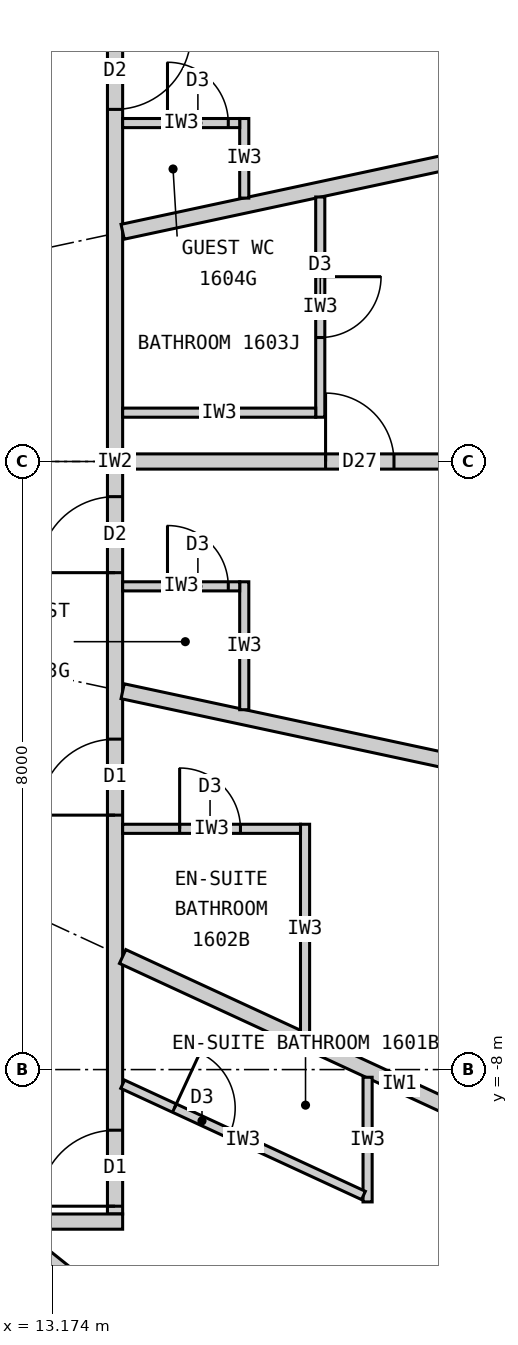
"""IFC4 building model, lengths in metres.
Left out: names, types, materials, properties, quantities, classifications, styles, units other than length and angle.
Written with IfcOpenShell. Run it as: python <this file> out.ifc"""

import sys

from ifc_helpers import new_model, si_unit, direction, frame, frame_2d, origin, place, context, subcontext, project, spatial, rectangle, extrude, element, fill, save


model = new_model("IFC4")
c1 = context("Model", 3, precision=1e-05, world=origin(), true_north=direction((0.0, 1.0)))
c2 = subcontext(c1, "Body", "Model", "MODEL_VIEW")
j1 = project(units=[si_unit("LENGTHUNIT", "METRE"), si_unit("PLANEANGLEUNIT", "RADIAN")], contexts=[c1])
p1 = place(None, origin())
s1 = spatial("IfcSite", under=j1, at=p1, CompositionType="ELEMENT")
p2 = place(p1, origin())
s2 = spatial("IfcBuilding", under=s1, at=p2, CompositionType="ELEMENT")
p3 = place(p2, frame((0.0, 0.0, 67.2)))
s3 = spatial("IfcBuildingStorey", under=s2, at=p3, CompositionType="ELEMENT", Elevation=67.2)
p4 = place(p3, frame((14.0, -9.9, 0.0), z_axis=(0.0, 0.0, 1.0), x_axis=(0.0, 1.0, 0.0)))
e1 = element("IfcWall", 1, at=p4, inside=s3, PredefinedType="PARTITIONING", context=c2, shape_type="SweptSolid", body=[
    extrude(rectangle(XDim=19.8, YDim=0.2, at=frame_2d((9.9, 0.0))), origin(), (0.0, 0.0, 1.0), 3.12),
])
p5 = place(p4, frame((0.103, 0.0, 0.0)))
e2 = element("IfcOpeningElement", 2, at=p5, cuts=e1, PredefinedType="OPENING", context=c2, shape_type="SweptSolid", body=[
    extrude(rectangle(XDim=1.0, YDim=2.2, at=frame_2d((0.5, 1.1))), frame((0.0, 0.11, 0.0), z_axis=(0.0, -1.0, 0.0), x_axis=(1.0, 0.0, 0.0)), (0.0, 0.0, 1.0), 0.22),
])
p6 = place(p4, frame((5.248, 0.0, 0.0)))
e3 = element("IfcOpeningElement", 3, at=p6, cuts=e1, PredefinedType="OPENING", context=c2, shape_type="SweptSolid", body=[
    extrude(rectangle(XDim=1.0, YDim=2.2, at=frame_2d((0.5, 1.1))), frame((0.0, 0.11, 0.0), z_axis=(0.0, -1.0, 0.0), x_axis=(1.0, 0.0, 0.0)), (0.0, 0.0, 1.0), 0.22),
])
p7 = place(p4, frame((8.438, 0.0, 0.0)))
e4 = element("IfcOpeningElement", 4, at=p7, cuts=e1, PredefinedType="OPENING", context=c2, shape_type="SweptSolid", body=[
    extrude(rectangle(XDim=1.0, YDim=2.2, at=frame_2d((0.5, 1.1))), frame((0.0, 0.11, 0.0), z_axis=(0.0, -1.0, 0.0), x_axis=(1.0, 0.0, 0.0)), (0.0, 0.0, 1.0), 0.22),
])
p8 = place(p4, frame((14.532, 0.0, 0.0)))
e5 = element("IfcOpeningElement", 5, at=p8, cuts=e1, PredefinedType="OPENING", context=c2, shape_type="SweptSolid", body=[
    extrude(rectangle(XDim=1.0, YDim=2.2, at=frame_2d((0.5, 1.1))), frame((0.0, 0.11, 0.0), z_axis=(0.0, -1.0, 0.0), x_axis=(1.0, 0.0, 0.0)), (0.0, 0.0, 1.0), 0.22),
])
p9 = place(p3, frame((14.1, -10.0, 0.0), z_axis=(0.0, 0.0, 1.0), x_axis=(-1.0, 0.0, 0.0)))
e6 = element("IfcWall", 6, at=p9, inside=s3, PredefinedType="PARTITIONING", context=c2, shape_type="SweptSolid", body=[
    extrude(rectangle(XDim=28.2, YDim=0.2, at=frame_2d((14.1, 0.0))), origin(), (0.0, 0.0, 1.0), 3.12),
])
p10 = place(p9, frame((23.865, 0.0, 0.0)))
e7 = element("IfcOpeningElement", 7, at=p10, cuts=e6, PredefinedType="OPENING", context=c2, shape_type="SweptSolid", body=[
    extrude(rectangle(XDim=1.0, YDim=2.2, at=frame_2d((0.5, 1.1))), frame((0.0, 0.11, 0.0), z_axis=(0.0, -1.0, 0.0), x_axis=(1.0, 0.0, 0.0)), (0.0, 0.0, 1.0), 0.22),
])
p11 = place(p9, frame((18.529, 0.0, 0.0)))
e8 = element("IfcOpeningElement", 8, at=p11, cuts=e6, PredefinedType="OPENING", context=c2, shape_type="SweptSolid", body=[
    extrude(rectangle(XDim=1.0, YDim=2.2, at=frame_2d((0.5, 1.1))), frame((0.0, 0.11, 0.0), z_axis=(0.0, -1.0, 0.0), x_axis=(1.0, 0.0, 0.0)), (0.0, 0.0, 1.0), 0.22),
])
p12 = place(p9, frame((14.623, 0.0, 0.0)))
e9 = element("IfcOpeningElement", 9, at=p12, cuts=e6, PredefinedType="OPENING", context=c2, shape_type="SweptSolid", body=[
    extrude(rectangle(XDim=1.0, YDim=2.2, at=frame_2d((0.5, 1.1))), frame((0.0, 0.11, 0.0), z_axis=(0.0, -1.0, 0.0), x_axis=(1.0, 0.0, 0.0)), (0.0, 0.0, 1.0), 0.22),
])
p13 = place(p9, frame((11.24, 0.0, 0.0)))
e10 = element("IfcOpeningElement", 10, at=p13, cuts=e6, PredefinedType="OPENING", context=c2, shape_type="SweptSolid", body=[
    extrude(rectangle(XDim=1.0, YDim=2.2, at=frame_2d((0.5, 1.1))), frame((0.0, 0.11, 0.0), z_axis=(0.0, -1.0, 0.0), x_axis=(1.0, 0.0, 0.0)), (0.0, 0.0, 1.0), 0.22),
])
p14 = place(p9, frame((8.671, 0.0, 0.0)))
e11 = element("IfcOpeningElement", 11, at=p14, cuts=e6, PredefinedType="OPENING", context=c2, shape_type="SweptSolid", body=[
    extrude(rectangle(XDim=1.0, YDim=2.2, at=frame_2d((0.5, 1.1))), frame((0.0, 0.11, 0.0), z_axis=(0.0, -1.0, 0.0), x_axis=(1.0, 0.0, 0.0)), (0.0, 0.0, 1.0), 0.22),
])
p15 = place(p9, frame((2.801, 0.0, 0.0)))
e12 = element("IfcOpeningElement", 12, at=p15, cuts=e6, PredefinedType="OPENING", context=c2, shape_type="SweptSolid", body=[
    extrude(rectangle(XDim=1.0, YDim=2.2, at=frame_2d((0.5, 1.1))), frame((0.0, 0.11, 0.0), z_axis=(0.0, -1.0, 0.0), x_axis=(1.0, 0.0, 0.0)), (0.0, 0.0, 1.0), 0.22),
])
p16 = place(p3, frame((14.1, 0.0, 0.0), z_axis=(0.0, 0.0, 1.0), x_axis=(1.0, 0.0, 0.0)))
e13 = element("IfcWall", 13, at=p16, inside=s3, PredefinedType="PARTITIONING", context=c2, shape_type="SweptSolid", body=[
    extrude(rectangle(XDim=10.75, YDim=0.2, at=frame_2d((5.375, 0.0))), origin(), (0.0, 0.0, 1.0), 2.27),
])
p17 = place(p16, frame((2.67, 0.0, 0.0)))
e14 = element("IfcOpeningElement", 14, at=p17, cuts=e13, PredefinedType="OPENING", context=c2, shape_type="SweptSolid", body=[
    extrude(rectangle(XDim=0.9, YDim=2.1, at=frame_2d((0.45, 1.05))), frame((0.0, 0.11, 0.0), z_axis=(0.0, -1.0, 0.0), x_axis=(1.0, 0.0, 0.0)), (0.0, 0.0, 1.0), 0.22),
])
p18 = place(p3, frame((14.1, 3.022, 0.0), z_axis=(0.0, 0.0, 1.0), x_axis=(0.977790014929, 0.209586943072, 0.0)))
e15 = element("IfcWall", 15, at=p18, inside=s3, PredefinedType="PARTITIONING", context=c2, shape_type="SweptSolid", body=[
    extrude(rectangle(XDim=10.087, YDim=0.2, at=frame_2d((5.043, 0.0))), origin(), (0.0, 0.0, 1.0), 2.32),
])
p19 = place(p3, frame((12.625, -10.1, 0.0), z_axis=(0.0, 0.0, 1.0), x_axis=(0.780892451574, -0.624665493744, 0.0)))
e16 = element("IfcWall", 16, at=p19, inside=s3, PredefinedType="PARTITIONING", context=c2, shape_type="SweptSolid", body=[
    extrude(rectangle(XDim=6.045, YDim=0.2, at=frame_2d((3.022, 0.0))), origin(), (0.0, 0.0, 1.0), 2.32),
])
p20 = place(p3, frame((14.1, -6.512, 0.0), z_axis=(0.0, 0.0, 1.0), x_axis=(0.907832871056, -0.419332181247, 0.0)))
e17 = element("IfcWall", 17, at=p20, inside=s3, PredefinedType="PARTITIONING", context=c2, shape_type="SweptSolid", body=[
    extrude(rectangle(XDim=8.023, YDim=0.2, at=frame_2d((4.011, 0.0))), origin(), (0.0, 0.0, 1.0), 2.32),
])
p21 = place(p3, frame((14.1, -3.022, 0.0), z_axis=(0.0, 0.0, 1.0), x_axis=(0.977790014929, -0.209586943072, 0.0)))
e18 = element("IfcWall", 18, at=p21, inside=s3, PredefinedType="PARTITIONING", context=c2, shape_type="SweptSolid", body=[
    extrude(rectangle(XDim=10.087, YDim=0.2, at=frame_2d((5.043, 0.0))), origin(), (0.0, 0.0, 1.0), 2.32),
])
p22 = place(p3, frame((17.323, -8.101, 0.0), z_axis=(0.0, 0.0, 1.0), x_axis=(0.0, -1.0, 0.0)))
e19 = element("IfcWall", 19, at=p22, inside=s3, PredefinedType="PARTITIONING", context=c2, shape_type="SweptSolid", body=[
    extrude(rectangle(XDim=1.64, YDim=0.12, at=frame_2d((0.82, 0.0))), origin(), (0.0, 0.0, 1.0), 3.12),
])
p23 = place(p3, frame((14.1, -8.193, 0.0), z_axis=(0.0, 0.0, 1.0), x_axis=(0.907836493557, -0.419324338628, 0.0)))
e20 = element("IfcWall", 20, at=p23, inside=s3, PredefinedType="PARTITIONING", context=c2, shape_type="SweptSolid", body=[
    extrude(rectangle(XDim=3.49, YDim=0.12, at=frame_2d((1.745, 0.0))), origin(), (0.0, 0.0, 1.0), 3.12),
])
p24 = place(p23, frame((0.75, 0.0, 0.0)))
e21 = element("IfcOpeningElement", 21, at=p24, cuts=e20, PredefinedType="OPENING", context=c2, shape_type="SweptSolid", body=[
    extrude(rectangle(XDim=0.8, YDim=2.1, at=frame_2d((0.4, 1.05))), frame((0.0, 0.07, 0.0), z_axis=(0.0, -1.0, 0.0), x_axis=(1.0, 0.0, 0.0)), (0.0, 0.0, 1.0), 0.14),
])
p25 = place(p3, frame((16.5, -7.521, 0.0), z_axis=(0.0, 0.0, 1.0), x_axis=(0.0, 1.0, 0.0)))
e22 = element("IfcWall", 22, at=p25, inside=s3, PredefinedType="PARTITIONING", context=c2, shape_type="SweptSolid", body=[
    extrude(rectangle(XDim=2.749, YDim=0.12, at=frame_2d((1.374, 0.0))), origin(), (0.0, 0.0, 1.0), 3.12),
])
p26 = place(p3, frame((14.1, -4.833, 0.0), z_axis=(0.0, 0.0, 1.0), x_axis=(1.0, 0.0, 0.0)))
e23 = element("IfcWall", 23, at=p26, inside=s3, PredefinedType="PARTITIONING", context=c2, shape_type="SweptSolid", body=[
    extrude(rectangle(XDim=2.34, YDim=0.12, at=frame_2d((1.17, 0.0))), origin(), (0.0, 0.0, 1.0), 3.12),
])
p27 = place(p26, frame((0.75, 0.0, 0.0)))
e24 = element("IfcOpeningElement", 24, at=p27, cuts=e23, PredefinedType="OPENING", context=c2, shape_type="SweptSolid", body=[
    extrude(rectangle(XDim=0.8, YDim=2.1, at=frame_2d((0.4, 1.05))), frame((0.0, 0.07, 0.0), z_axis=(0.0, -1.0, 0.0), x_axis=(1.0, 0.0, 0.0)), (0.0, 0.0, 1.0), 0.14),
])
p28 = place(p3, frame((15.7, -3.265, 0.0), z_axis=(0.0, 0.0, 1.0), x_axis=(0.0, 1.0, 0.0)))
e25 = element("IfcWall", 25, at=p28, inside=s3, PredefinedType="PARTITIONING", context=c2, shape_type="SweptSolid", body=[
    extrude(rectangle(XDim=1.683, YDim=0.12, at=frame_2d((0.841, 0.0))), origin(), (0.0, 0.0, 1.0), 3.12),
])
p29 = place(p3, frame((14.1, -1.643, 0.0), z_axis=(0.0, 0.0, 1.0), x_axis=(1.0, 0.0, 0.0)))
e26 = element("IfcWall", 26, at=p29, inside=s3, PredefinedType="PARTITIONING", context=c2, shape_type="SweptSolid", body=[
    extrude(rectangle(XDim=1.54, YDim=0.12, at=frame_2d((0.77, 0.0))), origin(), (0.0, 0.0, 1.0), 2.32),
])
p30 = place(p29, frame((0.59, 0.0, 0.0)))
e27 = element("IfcOpeningElement", 27, at=p30, cuts=e26, PredefinedType="OPENING", context=c2, shape_type="SweptSolid", body=[
    extrude(rectangle(XDim=0.8, YDim=2.1, at=frame_2d((0.4, 1.05))), frame((0.0, 0.07, 0.0), z_axis=(0.0, -1.0, 0.0), x_axis=(1.0, 0.0, 0.0)), (0.0, 0.0, 1.0), 0.14),
])
p31 = place(p3, frame((16.7, 3.48, 0.0), z_axis=(0.0, 0.0, 1.0), x_axis=(0.0, -1.0, 0.0)))
e28 = element("IfcWall", 28, at=p31, inside=s3, PredefinedType="PARTITIONING", context=c2, shape_type="SweptSolid", body=[
    extrude(rectangle(XDim=2.897, YDim=0.12, at=frame_2d((1.449, 0.0))), origin(), (0.0, 0.0, 1.0), 3.12),
])
p32 = place(p31, frame((1.049, 0.0, 0.0)))
e29 = element("IfcOpeningElement", 29, at=p32, cuts=e28, PredefinedType="OPENING", context=c2, shape_type="SweptSolid", body=[
    extrude(rectangle(XDim=0.8, YDim=2.1, at=frame_2d((0.4, 1.05))), frame((0.0, 0.07, 0.0), z_axis=(0.0, -1.0, 0.0), x_axis=(1.0, 0.0, 0.0)), (0.0, 0.0, 1.0), 0.14),
])
p33 = place(p3, frame((14.1, 0.643, 0.0), z_axis=(0.0, 0.0, 1.0), x_axis=(1.0, 0.0, 0.0)))
e30 = element("IfcWall", 30, at=p33, inside=s3, PredefinedType="PARTITIONING", context=c2, shape_type="SweptSolid", body=[
    extrude(rectangle(XDim=2.54, YDim=0.12, at=frame_2d((1.27, 0.0))), origin(), (0.0, 0.0, 1.0), 3.12),
])
p34 = place(p3, frame((15.7, 3.465, 0.0), z_axis=(0.0, 0.0, 1.0), x_axis=(0.0, 1.0, 0.0)))
e31 = element("IfcWall", 31, at=p34, inside=s3, PredefinedType="PARTITIONING", context=c2, shape_type="SweptSolid", body=[
    extrude(rectangle(XDim=1.047, YDim=0.12, at=frame_2d((0.523, 0.0))), origin(), (0.0, 0.0, 1.0), 3.12),
])
p35 = place(p3, frame((14.1, 4.452, 0.0), z_axis=(0.0, 0.0, 1.0), x_axis=(1.0, 0.0, 0.0)))
e32 = element("IfcWall", 32, at=p35, inside=s3, PredefinedType="PARTITIONING", context=c2, shape_type="SweptSolid", body=[
    extrude(rectangle(XDim=1.54, YDim=0.12, at=frame_2d((0.77, 0.0))), origin(), (0.0, 0.0, 1.0), 3.12),
])
p36 = place(p35, frame((0.59, 0.0, 0.0)))
e33 = element("IfcOpeningElement", 33, at=p36, cuts=e32, PredefinedType="OPENING", context=c2, shape_type="SweptSolid", body=[
    extrude(rectangle(XDim=0.8, YDim=2.1, at=frame_2d((0.4, 1.05))), frame((0.0, 0.07, 0.0), z_axis=(0.0, -1.0, 0.0), x_axis=(1.0, 0.0, 0.0)), (0.0, 0.0, 1.0), 0.14),
])
p37 = place(p24, origin())
e34 = element("IfcDoor", 34, at=p37, inside=s3, OperationType="SINGLE_SWING_LEFT", PredefinedType="DOOR", context=c2, shape_type="SweptSolid", body=[
    extrude(rectangle(XDim=0.8, YDim=2.1, at=frame_2d((0.4, 1.05))), frame((0.0, 0.025, 0.0), z_axis=(0.0, -1.0, 0.0), x_axis=(1.0, 0.0, 0.0)), (0.0, 0.0, 1.0), 0.05),
])
fill(e21, e34)
p38 = place(p5, origin())
e35 = element("IfcDoor", 35, at=p38, inside=s3, OperationType="SINGLE_SWING_LEFT", PredefinedType="DOOR", context=c2, shape_type="SweptSolid", body=[
    extrude(rectangle(XDim=1.0, YDim=2.2, at=frame_2d((0.5, 1.1))), frame((0.0, 0.025, 0.0), z_axis=(0.0, -1.0, 0.0), x_axis=(1.0, 0.0, 0.0)), (0.0, 0.0, 1.0), 0.05),
])
fill(e2, e35)
p39 = place(p27, origin())
e36 = element("IfcDoor", 36, at=p39, inside=s3, OperationType="SINGLE_SWING_LEFT", PredefinedType="DOOR", context=c2, shape_type="SweptSolid", body=[
    extrude(rectangle(XDim=0.8, YDim=2.1, at=frame_2d((0.4, 1.05))), frame((0.0, 0.025, 0.0), z_axis=(0.0, -1.0, 0.0), x_axis=(1.0, 0.0, 0.0)), (0.0, 0.0, 1.0), 0.05),
])
fill(e24, e36)
p40 = place(p6, origin())
e37 = element("IfcDoor", 37, at=p40, inside=s3, OperationType="SINGLE_SWING_LEFT", PredefinedType="DOOR", context=c2, shape_type="SweptSolid", body=[
    extrude(rectangle(XDim=1.0, YDim=2.2, at=frame_2d((0.5, 1.1))), frame((0.0, 0.025, 0.0), z_axis=(0.0, -1.0, 0.0), x_axis=(1.0, 0.0, 0.0)), (0.0, 0.0, 1.0), 0.05),
])
fill(e3, e37)
p41 = place(p30, origin())
e38 = element("IfcDoor", 38, at=p41, inside=s3, OperationType="SINGLE_SWING_LEFT", PredefinedType="DOOR", context=c2, shape_type="SweptSolid", body=[
    extrude(rectangle(XDim=0.8, YDim=2.1, at=frame_2d((0.4, 1.05))), frame((0.0, 0.025, 0.0), z_axis=(0.0, -1.0, 0.0), x_axis=(1.0, 0.0, 0.0)), (0.0, 0.0, 1.0), 0.05),
])
fill(e27, e38)
p42 = place(p7, origin())
e39 = element("IfcDoor", 39, at=p42, inside=s3, OperationType="SINGLE_SWING_LEFT", PredefinedType="DOOR", context=c2, shape_type="SweptSolid", body=[
    extrude(rectangle(XDim=1.0, YDim=2.2, at=frame_2d((0.5, 1.1))), frame((0.0, 0.025, 0.0), z_axis=(0.0, -1.0, 0.0), x_axis=(1.0, 0.0, 0.0)), (0.0, 0.0, 1.0), 0.05),
])
fill(e4, e39)
p43 = place(p32, origin())
e40 = element("IfcDoor", 40, at=p43, inside=s3, OperationType="SINGLE_SWING_LEFT", PredefinedType="DOOR", context=c2, shape_type="SweptSolid", body=[
    extrude(rectangle(XDim=0.8, YDim=2.1, at=frame_2d((0.4, 1.05))), frame((0.0, 0.025, 0.0), z_axis=(0.0, -1.0, 0.0), x_axis=(1.0, 0.0, 0.0)), (0.0, 0.0, 1.0), 0.05),
])
fill(e29, e40)
p44 = place(p17, origin())
e41 = element("IfcDoor", 41, at=p44, inside=s3, OperationType="SINGLE_SWING_LEFT", PredefinedType="DOOR", context=c2, shape_type="SweptSolid", body=[
    extrude(rectangle(XDim=0.9, YDim=2.1, at=frame_2d((0.45, 1.05))), frame((0.0, 0.025, 0.0), z_axis=(0.0, -1.0, 0.0), x_axis=(1.0, 0.0, 0.0)), (0.0, 0.0, 1.0), 0.05),
])
fill(e14, e41)
p45 = place(p36, origin())
e42 = element("IfcDoor", 42, at=p45, inside=s3, OperationType="SINGLE_SWING_LEFT", PredefinedType="DOOR", context=c2, shape_type="SweptSolid", body=[
    extrude(rectangle(XDim=0.8, YDim=2.1, at=frame_2d((0.4, 1.05))), frame((0.0, 0.025, 0.0), z_axis=(0.0, -1.0, 0.0), x_axis=(1.0, 0.0, 0.0)), (0.0, 0.0, 1.0), 0.05),
])
fill(e33, e42)
p46 = place(p8, origin())
e43 = element("IfcDoor", 43, at=p46, inside=s3, OperationType="SINGLE_SWING_RIGHT", PredefinedType="DOOR", context=c2, shape_type="SweptSolid", body=[
    extrude(rectangle(XDim=1.0, YDim=2.2, at=frame_2d((0.5, 1.1))), frame((0.0, 0.025, 0.0), z_axis=(0.0, -1.0, 0.0), x_axis=(1.0, 0.0, 0.0)), (0.0, 0.0, 1.0), 0.05),
])
fill(e5, e43)
save(model, sys.argv[1])
